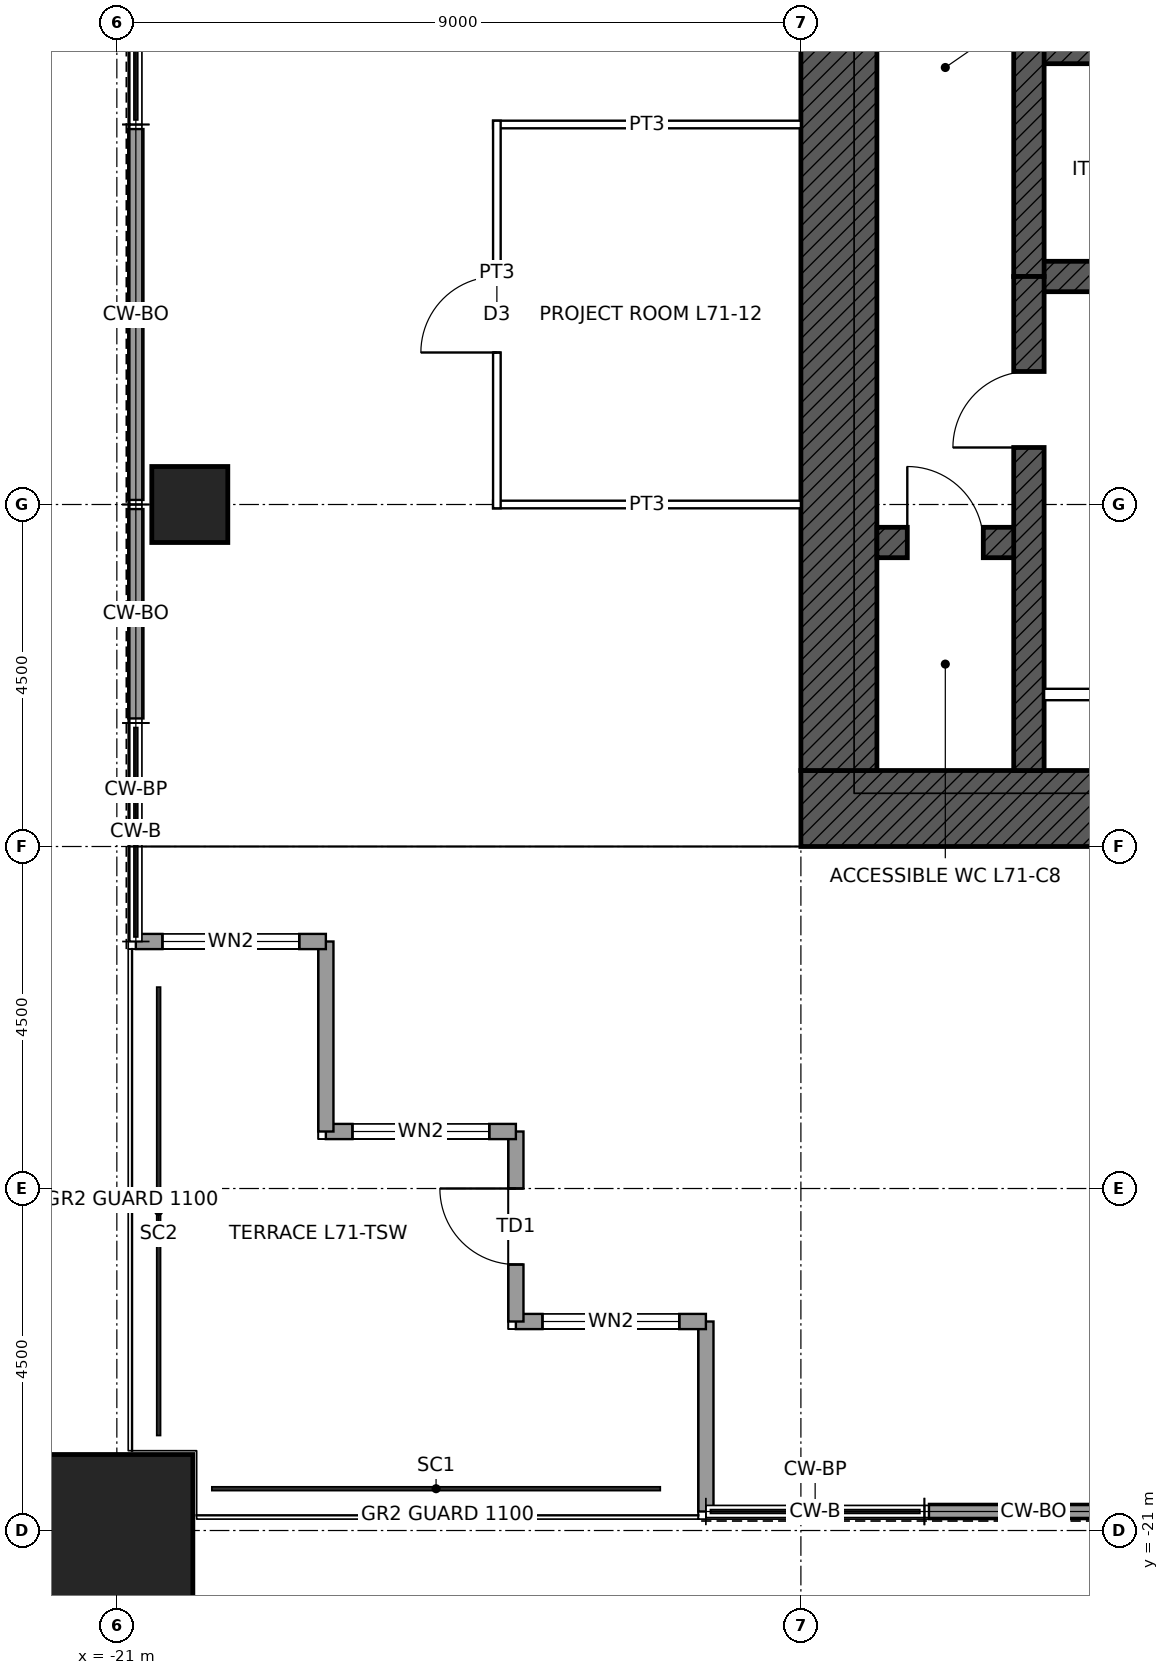
"""IFC4 building model, lengths in metres.
Left out: names, types, materials, properties, quantities, classifications, styles, units other than length and angle.
Written with IfcOpenShell. Run it as: python <this file> out.ifc"""

import sys

from ifc_helpers import new_model, si_unit, direction, frame, frame_2d, origin, origin_2d, place, context, subcontext, project, spatial, rectangle, hollow_rectangle, extrude, element, fill, save


model = new_model("IFC4")
c1 = context("Model", 3, precision=1e-05, world=origin(), true_north=direction((0.0, 1.0)))
c2 = subcontext(c1, "Body", "Model", "MODEL_VIEW")
j1 = project(units=[si_unit("LENGTHUNIT", "METRE"), si_unit("PLANEANGLEUNIT", "RADIAN")], contexts=[c1])
p1 = place(None, origin())
s1 = spatial("IfcSite", under=j1, at=p1, CompositionType="ELEMENT")
p2 = place(p1, origin())
s2 = spatial("IfcBuilding", under=s1, at=p2, CompositionType="ELEMENT")
p3 = place(p2, frame((0.0, 0.0, 319.9)))
s3 = spatial("IfcBuildingStorey", under=s2, at=p3, CompositionType="ELEMENT", Elevation=319.9)
p4 = place(p3, frame((-21.0, -21.0, 0.0), z_axis=(0.0, 0.0, 1.0), x_axis=(1.0, 0.0, 0.0)))
e1 = element("IfcColumn", 1, at=p4, inside=s3, PredefinedType="COLUMN", context=c2, shape_type="SweptSolid", body=[
    extrude(hollow_rectangle(XDim=2.0, YDim=2.0, WallThickness=0.095, at=origin_2d()), origin(), (0.0, 0.0, 1.0), 4.0),
])
p5 = place(p3, frame((-20.04, -7.5, 0.0), z_axis=(0.0, 0.0, 1.0), x_axis=(1.0, 0.0, 0.0)))
e2 = element("IfcColumn", 2, at=p5, inside=s3, PredefinedType="COLUMN", context=c2, shape_type="SweptSolid", body=[
    extrude(hollow_rectangle(XDim=1.0, YDim=1.0, WallThickness=0.075, at=origin_2d()), origin(), (0.0, 0.0, 1.0), 4.0),
])
p6 = place(p3, frame((12.0, -11.5, 0.0), z_axis=(0.0, 0.0, 1.0), x_axis=(-1.0, 0.0, 0.0)))
e3 = element("IfcWall", 3, at=p6, inside=s3, PredefinedType="SHEAR", context=c2, shape_type="SweptSolid", body=[
    extrude(rectangle(XDim=24.0, YDim=1.0, at=frame_2d((12.0, 0.0))), origin(), (0.0, 0.0, 1.0), 4.0),
])
p7 = place(p6, frame((11.5, 0.0, 0.0)))
e4 = element("IfcOpeningElement", 4, at=p7, cuts=e3, PredefinedType="OPENING", context=c2, shape_type="SweptSolid", body=[
    extrude(rectangle(XDim=1.0, YDim=2.1, at=frame_2d((0.5, 1.05))), frame((0.0, 0.51, 0.0), z_axis=(0.0, -1.0, 0.0), x_axis=(1.0, 0.0, 0.0)), (0.0, 0.0, 1.0), 1.02),
])
p8 = place(p6, frame((1.0, 0.0, 0.0)))
e5 = element("IfcOpeningElement", 5, at=p8, cuts=e3, PredefinedType="OPENING", context=c2, shape_type="SweptSolid", body=[
    extrude(rectangle(XDim=1.0, YDim=2.4, at=frame_2d((0.5, 1.2))), frame((0.0, 0.51, 0.0), z_axis=(0.0, -1.0, 0.0), x_axis=(1.0, 0.0, 0.0)), (0.0, 0.0, 1.0), 1.02),
])
p9 = place(p3, frame((-11.5, -11.0, 0.0), z_axis=(0.0, 0.0, 1.0), x_axis=(0.0, 1.0, 0.0)))
e6 = element("IfcWall", 6, at=p9, inside=s3, PredefinedType="SHEAR", context=c2, shape_type="SweptSolid", body=[
    extrude(rectangle(XDim=22.0, YDim=1.0, at=frame_2d((11.0, 0.0))), origin(), (0.0, 0.0, 1.0), 4.0),
])
p10 = place(p9, frame((10.5, 0.0, 0.0)))
e7 = element("IfcOpeningElement", 7, at=p10, cuts=e6, PredefinedType="OPENING", context=c2, shape_type="SweptSolid", body=[
    extrude(rectangle(XDim=1.0, YDim=2.4, at=frame_2d((0.5, 1.2))), frame((0.0, 0.51, 0.0), z_axis=(0.0, -1.0, 0.0), x_axis=(1.0, 0.0, 0.0)), (0.0, 0.0, 1.0), 1.02),
])
p11 = place(p3, frame((-9.0, -1.5, 0.0), z_axis=(0.0, 0.0, 1.0), x_axis=(1.0, 0.0, 0.0)))
e8 = element("IfcWall", 8, at=p11, inside=s3, PredefinedType="SHEAR", context=c2, shape_type="SweptSolid", body=[
    extrude(rectangle(XDim=18.0, YDim=0.4, at=frame_2d((9.0, 0.0))), origin(), (0.0, 0.0, 1.0), 4.0),
])
p12 = place(p11, frame((9.95, 0.0, 0.0)))
e9 = element("IfcOpeningElement", 9, at=p12, cuts=e8, PredefinedType="OPENING", context=c2, shape_type="SweptSolid", body=[
    extrude(rectangle(XDim=1.1, YDim=2.1, at=frame_2d((0.55, 1.05))), frame((0.0, 0.21, 0.0), z_axis=(0.0, -1.0, 0.0), x_axis=(1.0, 0.0, 0.0)), (0.0, 0.0, 1.0), 0.42),
])
p13 = place(p11, frame((12.95, 0.0, 0.0)))
e10 = element("IfcOpeningElement", 10, at=p13, cuts=e8, PredefinedType="OPENING", context=c2, shape_type="SweptSolid", body=[
    extrude(rectangle(XDim=1.1, YDim=2.1, at=frame_2d((0.55, 1.05))), frame((0.0, 0.21, 0.0), z_axis=(0.0, -1.0, 0.0), x_axis=(1.0, 0.0, 0.0)), (0.0, 0.0, 1.0), 0.42),
])
p14 = place(p11, frame((15.95, 0.0, 0.0)))
e11 = element("IfcOpeningElement", 11, at=p14, cuts=e8, PredefinedType="OPENING", context=c2, shape_type="SweptSolid", body=[
    extrude(rectangle(XDim=1.1, YDim=2.1, at=frame_2d((0.55, 1.05))), frame((0.0, 0.21, 0.0), z_axis=(0.0, -1.0, 0.0), x_axis=(1.0, 0.0, 0.0)), (0.0, 0.0, 1.0), 0.42),
])
p15 = place(p11, frame((0.95, 0.0, 0.0)))
e12 = element("IfcOpeningElement", 12, at=p15, cuts=e8, PredefinedType="OPENING", context=c2, shape_type="SweptSolid", body=[
    extrude(rectangle(XDim=1.1, YDim=2.1, at=frame_2d((0.55, 1.05))), frame((0.0, 0.21, 0.0), z_axis=(0.0, -1.0, 0.0), x_axis=(1.0, 0.0, 0.0)), (0.0, 0.0, 1.0), 0.42),
])
p16 = place(p11, frame((3.95, 0.0, 0.0)))
e13 = element("IfcOpeningElement", 13, at=p16, cuts=e8, PredefinedType="OPENING", context=c2, shape_type="SweptSolid", body=[
    extrude(rectangle(XDim=1.1, YDim=2.1, at=frame_2d((0.55, 1.05))), frame((0.0, 0.21, 0.0), z_axis=(0.0, -1.0, 0.0), x_axis=(1.0, 0.0, 0.0)), (0.0, 0.0, 1.0), 0.42),
])
p17 = place(p11, frame((6.95, 0.0, 0.0)))
e14 = element("IfcOpeningElement", 14, at=p17, cuts=e8, PredefinedType="OPENING", context=c2, shape_type="SweptSolid", body=[
    extrude(rectangle(XDim=1.1, YDim=2.1, at=frame_2d((0.55, 1.05))), frame((0.0, 0.21, 0.0), z_axis=(0.0, -1.0, 0.0), x_axis=(1.0, 0.0, 0.0)), (0.0, 0.0, 1.0), 0.42),
])
p18 = place(p3, frame((-9.0, -4.5, 0.0), z_axis=(0.0, 0.0, 1.0), x_axis=(1.0, 0.0, 0.0)))
e15 = element("IfcWall", 15, at=p18, inside=s3, PredefinedType="SHEAR", context=c2, shape_type="SweptSolid", body=[
    extrude(rectangle(XDim=18.0, YDim=0.4, at=frame_2d((9.0, 0.0))), origin(), (0.0, 0.0, 1.0), 4.0),
])
p19 = place(p3, frame((-11.0, -8.0, 0.0), z_axis=(0.0, 0.0, 1.0), x_axis=(1.0, 0.0, 0.0)))
e16 = element("IfcWall", 16, at=p19, inside=s3, PredefinedType="SHEAR", context=c2, shape_type="SweptSolid", body=[
    extrude(rectangle(XDim=2.0, YDim=0.4, at=frame_2d((1.0, 0.0))), origin(), (0.0, 0.0, 1.0), 4.0),
])
p20 = place(p19, frame((0.4, 0.0, 0.0)))
e17 = element("IfcOpeningElement", 17, at=p20, cuts=e16, PredefinedType="OPENING", context=c2, shape_type="SweptSolid", body=[
    extrude(rectangle(XDim=1.0, YDim=2.1, at=frame_2d((0.5, 1.05))), frame((0.0, 0.21, 0.0), z_axis=(0.0, -1.0, 0.0), x_axis=(1.0, 0.0, 0.0)), (0.0, 0.0, 1.0), 0.42),
])
p21 = place(p3, frame((-9.0, -4.5, 0.0), z_axis=(0.0, 0.0, 1.0), x_axis=(0.0, 1.0, 0.0)))
e18 = element("IfcWall", 18, at=p21, inside=s3, PredefinedType="SHEAR", context=c2, shape_type="SweptSolid", body=[
    extrude(rectangle(XDim=3.0, YDim=0.4, at=frame_2d((1.5, 0.0))), origin(), (0.0, 0.0, 1.0), 4.0),
])
p22 = place(p3, frame((-9.0, -11.0, 0.0), z_axis=(0.0, 0.0, 1.0), x_axis=(0.0, 1.0, 0.0)))
e19 = element("IfcWall", 19, at=p22, inside=s3, PredefinedType="SHEAR", context=c2, shape_type="SweptSolid", body=[
    extrude(rectangle(XDim=6.5, YDim=0.4, at=frame_2d((3.25, 0.0))), origin(), (0.0, 0.0, 1.0), 4.0),
])
p23 = place(p22, frame((4.25, 0.0, 0.0)))
e20 = element("IfcOpeningElement", 20, at=p23, cuts=e19, PredefinedType="OPENING", context=c2, shape_type="SweptSolid", body=[
    extrude(rectangle(XDim=1.0, YDim=2.1, at=frame_2d((0.5, 1.05))), frame((0.0, 0.21, 0.0), z_axis=(0.0, -1.0, 0.0), x_axis=(1.0, 0.0, 0.0)), (0.0, 0.0, 1.0), 0.42),
])
p24 = place(p3, frame((-13.25, -20.75, 0.0), z_axis=(0.0, 0.0, 1.0), x_axis=(0.0, 1.0, 0.0)))
e21 = element("IfcWall", 21, at=p24, inside=s3, PredefinedType="SOLIDWALL", context=c2, shape_type="SweptSolid", body=[
    extrude(rectangle(XDim=2.5, YDim=0.2, at=frame_2d((1.25, 0.0))), origin(), (0.0, 0.0, 1.0), 3.85),
])
p25 = place(p3, frame((-13.25, -18.25, 0.0), z_axis=(0.0, 0.0, 1.0), x_axis=(-1.0, 0.0, 0.0)))
e22 = element("IfcWall", 22, at=p25, inside=s3, PredefinedType="SOLIDWALL", context=c2, shape_type="SweptSolid", body=[
    extrude(rectangle(XDim=2.5, YDim=0.2, at=frame_2d((1.25, 0.0))), origin(), (0.0, 0.0, 1.0), 3.85),
])
p26 = place(p25, frame((0.35, 0.0, 0.3)))
e23 = element("IfcOpeningElement", 23, at=p26, cuts=e22, PredefinedType="OPENING", context=c2, shape_type="SweptSolid", body=[
    extrude(rectangle(XDim=1.8, YDim=2.4, at=frame_2d((0.9, 1.2))), frame((0.0, 0.11, 0.0), z_axis=(0.0, -1.0, 0.0), x_axis=(1.0, 0.0, 0.0)), (0.0, 0.0, 1.0), 0.22),
])
p27 = place(p3, frame((-15.75, -18.25, 0.0), z_axis=(0.0, 0.0, 1.0), x_axis=(0.0, 1.0, 0.0)))
e24 = element("IfcWall", 24, at=p27, inside=s3, PredefinedType="SOLIDWALL", context=c2, shape_type="SweptSolid", body=[
    extrude(rectangle(XDim=2.5, YDim=0.2, at=frame_2d((1.25, 0.0))), origin(), (0.0, 0.0, 1.0), 3.317),
])
p28 = place(p27, frame((0.75, 0.0, 0.0)))
e25 = element("IfcOpeningElement", 25, at=p28, cuts=e24, PredefinedType="OPENING", context=c2, shape_type="SweptSolid", body=[
    extrude(rectangle(XDim=1.0, YDim=2.4, at=frame_2d((0.5, 1.2))), frame((0.0, 0.11, 0.0), z_axis=(0.0, -1.0, 0.0), x_axis=(1.0, 0.0, 0.0)), (0.0, 0.0, 1.0), 0.22),
])
p29 = place(p3, frame((-15.75, -15.75, 0.0), z_axis=(0.0, 0.0, 1.0), x_axis=(-1.0, 0.0, 0.0)))
e26 = element("IfcWall", 26, at=p29, inside=s3, PredefinedType="SOLIDWALL", context=c2, shape_type="SweptSolid", body=[
    extrude(rectangle(XDim=2.5, YDim=0.2, at=frame_2d((1.25, 0.0))), origin(), (0.0, 0.0, 1.0), 3.85),
])
p30 = place(p29, frame((0.35, 0.0, 0.3)))
e27 = element("IfcOpeningElement", 27, at=p30, cuts=e26, PredefinedType="OPENING", context=c2, shape_type="SweptSolid", body=[
    extrude(rectangle(XDim=1.8, YDim=2.4, at=frame_2d((0.9, 1.2))), frame((0.0, 0.11, 0.0), z_axis=(0.0, -1.0, 0.0), x_axis=(1.0, 0.0, 0.0)), (0.0, 0.0, 1.0), 0.22),
])
p31 = place(p3, frame((-18.25, -15.75, 0.0), z_axis=(0.0, 0.0, 1.0), x_axis=(0.0, 1.0, 0.0)))
e28 = element("IfcWall", 28, at=p31, inside=s3, PredefinedType="SOLIDWALL", context=c2, shape_type="SweptSolid", body=[
    extrude(rectangle(XDim=2.5, YDim=0.2, at=frame_2d((1.25, 0.0))), origin(), (0.0, 0.0, 1.0), 3.85),
])
p32 = place(p3, frame((-18.25, -13.25, 0.0), z_axis=(0.0, 0.0, 1.0), x_axis=(-1.0, 0.0, 0.0)))
e29 = element("IfcWall", 29, at=p32, inside=s3, PredefinedType="SOLIDWALL", context=c2, shape_type="SweptSolid", body=[
    extrude(rectangle(XDim=2.5, YDim=0.2, at=frame_2d((1.25, 0.0))), origin(), (0.0, 0.0, 1.0), 3.85),
])
p33 = place(p32, frame((0.35, 0.0, 0.3)))
e30 = element("IfcOpeningElement", 30, at=p33, cuts=e29, PredefinedType="OPENING", context=c2, shape_type="SweptSolid", body=[
    extrude(rectangle(XDim=1.8, YDim=2.4, at=frame_2d((0.9, 1.2))), frame((0.0, 0.11, 0.0), z_axis=(0.0, -1.0, 0.0), x_axis=(1.0, 0.0, 0.0)), (0.0, 0.0, 1.0), 0.22),
])
for number, where, z_axis, x_axis in (
    (31, (-7.56, -20.75, 0.0), (0.0, 0.0, 1.0), (-1.0, 0.0, 0.0)),
    (32, (-20.75, -10.315, 0.0), (0.0, 0.0, 1.0), (0.0, 1.0, 0.0)),
):
    element("IfcWall", number, at=place(p3, frame(where, z_axis=z_axis, x_axis=x_axis)), inside=s3, PredefinedType="SOLIDWALL", context=c2, shape_type="SweptSolid", body=[
        extrude(rectangle(XDim=2.755, YDim=0.2, at=frame_2d((1.377, 0.0))), origin(), (0.0, 0.0, 1.0), 3.85),
    ])
for number, where, z_axis, x_axis in (
    (33, (-20.75, -7.44, 0.0), (0.0, 0.0, 1.0), (0.0, 1.0, 0.0)),
    (34, (-20.75, -4.97, 0.0), (0.0, 0.0, 1.0), (0.0, 1.0, 0.0)),
):
    element("IfcWall", number, at=place(p3, frame(where, z_axis=z_axis, x_axis=x_axis)), inside=s3, PredefinedType="SOLIDWALL", context=c2, shape_type="SweptSolid", body=[
        extrude(rectangle(XDim=2.41, YDim=0.2, at=frame_2d((1.205, 0.0))), origin(), (0.0, 0.0, 1.0), 3.85),
    ])
p34 = place(p3, frame((-16.05, -7.5, 0.0), z_axis=(0.0, 0.0, 1.0), x_axis=(1.0, 0.0, 0.0)))
e35 = element("IfcWall", 35, at=p34, inside=s3, PredefinedType="PARTITIONING", context=c2, shape_type="SweptSolid", body=[
    extrude(rectangle(XDim=4.05, YDim=0.1, at=frame_2d((2.025, 0.0))), origin(), (0.0, 0.0, 1.0), 3.243),
])
p35 = place(p3, frame((-16.05, -2.5, 0.0), z_axis=(0.0, 0.0, 1.0), x_axis=(1.0, 0.0, 0.0)))
e36 = element("IfcWall", 36, at=p35, inside=s3, PredefinedType="PARTITIONING", context=c2, shape_type="SweptSolid", body=[
    extrude(rectangle(XDim=4.05, YDim=0.1, at=frame_2d((2.025, 0.0))), origin(), (0.0, 0.0, 1.0), 3.85),
])
p36 = place(p3, frame((-16.0, -7.55, 0.0), z_axis=(0.0, 0.0, 1.0), x_axis=(0.0, 1.0, 0.0)))
e37 = element("IfcWall", 37, at=p36, inside=s3, PredefinedType="PARTITIONING", context=c2, shape_type="SweptSolid", body=[
    extrude(rectangle(XDim=5.1, YDim=0.1, at=frame_2d((2.55, 0.0))), origin(), (0.0, 0.0, 1.0), 3.85),
])
p37 = place(p36, frame((2.05, 0.0, 0.0)))
e38 = element("IfcOpeningElement", 38, at=p37, cuts=e37, PredefinedType="OPENING", context=c2, shape_type="SweptSolid", body=[
    extrude(rectangle(XDim=1.0, YDim=2.1, at=frame_2d((0.5, 1.05))), frame((0.0, 0.06, 0.0), z_axis=(0.0, -1.0, 0.0), x_axis=(1.0, 0.0, 0.0)), (0.0, 0.0, 1.0), 0.12),
])
p38 = place(p3, frame((-8.8, -10.0, 0.0), z_axis=(0.0, 0.0, 1.0), x_axis=(1.0, 0.0, 0.0)))
e39 = element("IfcWall", 39, at=p38, inside=s3, PredefinedType="PARTITIONING", context=c2, shape_type="SweptSolid", body=[
    extrude(rectangle(XDim=5.6, YDim=0.15, at=frame_2d((2.8, 0.0))), origin(), (0.0, 0.0, 1.0), 3.75),
])
p39 = place(p38, frame((2.3, 0.0, 0.0)))
e40 = element("IfcOpeningElement", 40, at=p39, cuts=e39, PredefinedType="OPENING", context=c2, shape_type="SweptSolid", body=[
    extrude(rectangle(XDim=1.0, YDim=2.1, at=frame_2d((0.5, 1.05))), frame((0.0, 0.085, 0.0), z_axis=(0.0, -1.0, 0.0), x_axis=(1.0, 0.0, 0.0)), (0.0, 0.0, 1.0), 0.17),
])
p40 = place(p26, origin())
e41 = element("IfcWindow", 41, at=p40, inside=s3, PartitioningType="SINGLE_PANEL", PredefinedType="WINDOW", context=c2, shape_type="SweptSolid", body=[
    extrude(rectangle(XDim=1.8, YDim=2.4, at=frame_2d((0.9, 1.2))), frame((0.0, 0.03, 0.0), z_axis=(0.0, -1.0, 0.0), x_axis=(1.0, 0.0, 0.0)), (0.0, 0.0, 1.0), 0.06),
])
fill(e23, e41)
p41 = place(p28, origin())
e42 = element("IfcDoor", 42, at=p41, inside=s3, OperationType="SINGLE_SWING_RIGHT", PredefinedType="DOOR", context=c2, shape_type="SweptSolid", body=[
    extrude(rectangle(XDim=1.0, YDim=2.4, at=frame_2d((0.5, 1.2))), frame((0.0, 0.025, 0.0), z_axis=(0.0, -1.0, 0.0), x_axis=(1.0, 0.0, 0.0)), (0.0, 0.0, 1.0), 0.05),
])
fill(e25, e42)
p42 = place(p30, origin())
e43 = element("IfcWindow", 43, at=p42, inside=s3, PartitioningType="SINGLE_PANEL", PredefinedType="WINDOW", context=c2, shape_type="SweptSolid", body=[
    extrude(rectangle(XDim=1.8, YDim=2.4, at=frame_2d((0.9, 1.2))), frame((0.0, 0.03, 0.0), z_axis=(0.0, -1.0, 0.0), x_axis=(1.0, 0.0, 0.0)), (0.0, 0.0, 1.0), 0.06),
])
fill(e27, e43)
p43 = place(p33, origin())
e44 = element("IfcWindow", 44, at=p43, inside=s3, PartitioningType="SINGLE_PANEL", PredefinedType="WINDOW", context=c2, shape_type="SweptSolid", body=[
    extrude(rectangle(XDim=1.8, YDim=2.4, at=frame_2d((0.9, 1.2))), frame((0.0, 0.03, 0.0), z_axis=(0.0, -1.0, 0.0), x_axis=(1.0, 0.0, 0.0)), (0.0, 0.0, 1.0), 0.06),
])
fill(e30, e44)
p44 = place(p23, origin())
e45 = element("IfcDoor", 45, at=p44, inside=s3, OperationType="SINGLE_SWING_LEFT", PredefinedType="DOOR", context=c2, shape_type="SweptSolid", body=[
    extrude(rectangle(XDim=1.0, YDim=2.1, at=frame_2d((0.5, 1.05))), frame((0.0, 0.025, 0.0), z_axis=(0.0, -1.0, 0.0), x_axis=(1.0, 0.0, 0.0)), (0.0, 0.0, 1.0), 0.05),
])
fill(e20, e45)
p45 = place(p20, origin())
e46 = element("IfcDoor", 46, at=p45, inside=s3, OperationType="SINGLE_SWING_LEFT", PredefinedType="DOOR", context=c2, shape_type="SweptSolid", body=[
    extrude(rectangle(XDim=1.0, YDim=2.1, at=frame_2d((0.5, 1.05))), frame((0.0, 0.025, 0.0), z_axis=(0.0, -1.0, 0.0), x_axis=(1.0, 0.0, 0.0)), (0.0, 0.0, 1.0), 0.05),
])
fill(e17, e46)
p46 = place(p37, origin())
e47 = element("IfcDoor", 47, at=p46, inside=s3, OperationType="SINGLE_SWING_LEFT", PredefinedType="DOOR", context=c2, shape_type="SweptSolid", body=[
    extrude(rectangle(XDim=1.0, YDim=2.1, at=frame_2d((0.5, 1.05))), frame((0.0, 0.025, 0.0), z_axis=(0.0, -1.0, 0.0), x_axis=(1.0, 0.0, 0.0)), (0.0, 0.0, 1.0), 0.05),
])
fill(e38, e47)
save(model, sys.argv[1])
